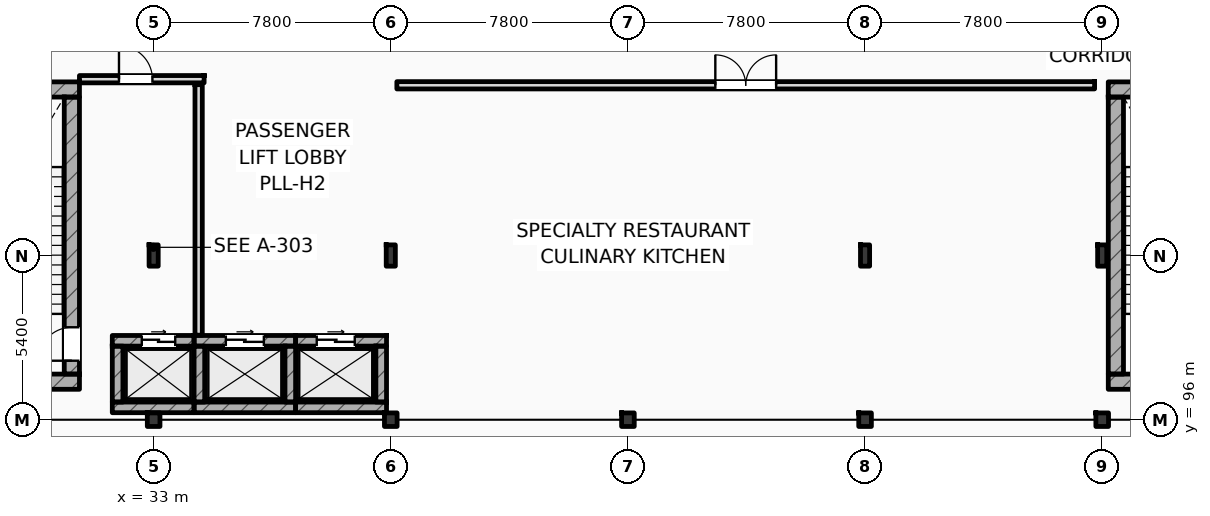
"""IFC4 building model, lengths in metres.
Left out: names, types, materials, properties, quantities, classifications, styles, units other than length and angle.
Written with IfcOpenShell. Run it as: python <this file> out.ifc"""

import sys

from ifc_helpers import new_model, si_unit, direction, frame, frame_2d, origin, origin_2d, place, context, subcontext, project, spatial, rectangle, i_section, extrude, element, fill, save


model = new_model("IFC4")
c1 = context("Model", 3, precision=1e-05, world=origin(), true_north=direction((0.0, 1.0)))
c2 = subcontext(c1, "Body", "Model", "MODEL_VIEW")
j1 = project(units=[si_unit("LENGTHUNIT", "METRE"), si_unit("PLANEANGLEUNIT", "RADIAN")], contexts=[c1])
p1 = place(None, origin())
s1 = spatial("IfcSite", under=j1, at=p1, CompositionType="ELEMENT")
p2 = place(p1, origin())
s2 = spatial("IfcBuilding", under=s1, at=p2, CompositionType="ELEMENT")
p3 = place(p2, frame((0.0, 0.0, 6.0)))
s3 = spatial("IfcBuildingStorey", under=s2, at=p3, CompositionType="ELEMENT", Elevation=6.0)
p4 = place(p3, frame((33.0, 96.0, 0.0), z_axis=(0.0, 0.0, 1.0), x_axis=(1.0, 0.0, 0.0)))
e1 = element("IfcColumn", 1, at=p4, inside=s3, PredefinedType="COLUMN", context=c2, shape_type="SweptSolid", body=[
    extrude(i_section(OverallWidth=0.416, OverallDepth=0.446, WebThickness=0.036, FlangeThickness=0.048, FilletRadius=0.015, at=origin_2d()), origin(), (0.0, 0.0, 1.0), 5.4),
])
p5 = place(p3, frame((33.0, 101.4, 0.0), z_axis=(0.0, 0.0, 1.0), x_axis=(1.0, 0.0, 0.0)))
e2 = element("IfcColumn", 2, at=p5, inside=s3, PredefinedType="COLUMN", context=c2, shape_type="SweptSolid", body=[
    extrude(i_section(OverallWidth=0.3, OverallDepth=0.7, WebThickness=0.017, FlangeThickness=0.032, FilletRadius=0.027, at=origin_2d()), origin(), (0.0, 0.0, 1.0), 5.4),
])
p6 = place(p3, frame((40.8, 96.0, 0.0), z_axis=(0.0, 0.0, 1.0), x_axis=(1.0, 0.0, 0.0)))
e3 = element("IfcColumn", 3, at=p6, inside=s3, PredefinedType="COLUMN", context=c2, shape_type="SweptSolid", body=[
    extrude(i_section(OverallWidth=0.416, OverallDepth=0.446, WebThickness=0.036, FlangeThickness=0.048, FilletRadius=0.015, at=origin_2d()), origin(), (0.0, 0.0, 1.0), 5.4),
])
p7 = place(p3, frame((40.8, 101.4, 0.0), z_axis=(0.0, 0.0, 1.0), x_axis=(1.0, 0.0, 0.0)))
e4 = element("IfcColumn", 4, at=p7, inside=s3, PredefinedType="COLUMN", context=c2, shape_type="SweptSolid", body=[
    extrude(i_section(OverallWidth=0.3, OverallDepth=0.7, WebThickness=0.017, FlangeThickness=0.032, FilletRadius=0.027, at=origin_2d()), origin(), (0.0, 0.0, 1.0), 5.4),
])
p8 = place(p3, frame((48.6, 96.0, 0.0), z_axis=(0.0, 0.0, 1.0), x_axis=(1.0, 0.0, 0.0)))
e5 = element("IfcColumn", 5, at=p8, inside=s3, PredefinedType="COLUMN", context=c2, shape_type="SweptSolid", body=[
    extrude(i_section(OverallWidth=0.416, OverallDepth=0.446, WebThickness=0.036, FlangeThickness=0.048, FilletRadius=0.015, at=origin_2d()), origin(), (0.0, 0.0, 1.0), 5.4),
])
p9 = place(p3, frame((48.6, 101.4, 0.0), z_axis=(0.0, 0.0, 1.0), x_axis=(1.0, 0.0, 0.0)))
e6 = element("IfcColumn", 6, at=p9, inside=s3, PredefinedType="COLUMN", context=c2, shape_type="SweptSolid", body=[
    extrude(i_section(OverallWidth=0.3, OverallDepth=0.7, WebThickness=0.017, FlangeThickness=0.032, FilletRadius=0.027, at=origin_2d()), origin(), (0.0, 0.0, 1.0), 5.4),
])
p10 = place(p3, frame((56.4, 96.0, 0.0), z_axis=(0.0, 0.0, 1.0), x_axis=(1.0, 0.0, 0.0)))
e7 = element("IfcColumn", 7, at=p10, inside=s3, PredefinedType="COLUMN", context=c2, shape_type="SweptSolid", body=[
    extrude(i_section(OverallWidth=0.416, OverallDepth=0.446, WebThickness=0.036, FlangeThickness=0.048, FilletRadius=0.015, at=origin_2d()), origin(), (0.0, 0.0, 1.0), 5.4),
])
p11 = place(p3, frame((56.4, 101.4, 0.0), z_axis=(0.0, 0.0, 1.0), x_axis=(1.0, 0.0, 0.0)))
e8 = element("IfcColumn", 8, at=p11, inside=s3, PredefinedType="COLUMN", context=c2, shape_type="SweptSolid", body=[
    extrude(i_section(OverallWidth=0.3, OverallDepth=0.7, WebThickness=0.017, FlangeThickness=0.032, FilletRadius=0.027, at=origin_2d()), origin(), (0.0, 0.0, 1.0), 5.4),
])
p12 = place(p3, frame((64.2, 96.0, 0.0), z_axis=(0.0, 0.0, 1.0), x_axis=(1.0, 0.0, 0.0)))
e9 = element("IfcColumn", 9, at=p12, inside=s3, PredefinedType="COLUMN", context=c2, shape_type="SweptSolid", body=[
    extrude(i_section(OverallWidth=0.416, OverallDepth=0.446, WebThickness=0.036, FlangeThickness=0.048, FilletRadius=0.015, at=origin_2d()), origin(), (0.0, 0.0, 1.0), 5.4),
])
p13 = place(p3, frame((64.2, 101.4, 0.0), z_axis=(0.0, 0.0, 1.0), x_axis=(1.0, 0.0, 0.0)))
e10 = element("IfcColumn", 10, at=p13, inside=s3, PredefinedType="COLUMN", context=c2, shape_type="SweptSolid", body=[
    extrude(i_section(OverallWidth=0.3, OverallDepth=0.7, WebThickness=0.017, FlangeThickness=0.032, FilletRadius=0.027, at=origin_2d()), origin(), (0.0, 0.0, 1.0), 5.4),
])
for number, where, z_axis, x_axis in (
    (11, (25.4, 106.862, 0.0), (0.0, 0.0, 1.0), (1.0, 0.0, 0.0)),
    (12, (25.4, 97.25, 0.0), (0.0, 0.0, 1.0), (1.0, 0.0, 0.0)),
):
    element("IfcWall", number, at=place(p3, frame(where, z_axis=z_axis, x_axis=x_axis)), inside=s3, PredefinedType="SHEAR", context=c2, shape_type="SweptSolid", body=[
        extrude(rectangle(XDim=5.16, YDim=0.5, at=frame_2d((2.58, 0.0))), origin(), (0.0, 0.0, 1.0), 5.4),
    ])
p14 = place(p3, frame((30.31, 97.5, 0.0), z_axis=(0.0, 0.0, 1.0), x_axis=(0.0, 1.0, 0.0)))
e13 = element("IfcWall", 13, at=p14, inside=s3, PredefinedType="SHEAR", context=c2, shape_type="SweptSolid", body=[
    extrude(rectangle(XDim=9.112, YDim=0.5, at=frame_2d((4.556, 0.0))), origin(), (0.0, 0.0, 1.0), 5.4),
])
p15 = place(p14, frame((0.44, 0.0, 0.0)))
e14 = element("IfcOpeningElement", 14, at=p15, cuts=e13, PredefinedType="OPENING", context=c2, shape_type="SweptSolid", body=[
    extrude(rectangle(XDim=1.1, YDim=2.2, at=frame_2d((0.55, 1.1))), frame((0.0, 0.26, 0.0), z_axis=(0.0, -1.0, 0.0), x_axis=(1.0, 0.0, 0.0)), (0.0, 0.0, 1.0), 0.52),
])
for number, where, z_axis, x_axis in (
    (15, (64.4, 106.862, 0.0), (0.0, 0.0, 1.0), (1.0, 0.0, 0.0)),
    (16, (64.4, 97.25, 0.0), (0.0, 0.0, 1.0), (1.0, 0.0, 0.0)),
):
    element("IfcWall", number, at=place(p3, frame(where, z_axis=z_axis, x_axis=x_axis)), inside=s3, PredefinedType="SHEAR", context=c2, shape_type="SweptSolid", body=[
        extrude(rectangle(XDim=5.16, YDim=0.5, at=frame_2d((2.58, 0.0))), origin(), (0.0, 0.0, 1.0), 5.4),
    ])
p16 = place(p3, frame((64.65, 97.5, 0.0), z_axis=(0.0, 0.0, 1.0), x_axis=(0.0, 1.0, 0.0)))
e17 = element("IfcWall", 17, at=p16, inside=s3, PredefinedType="SHEAR", context=c2, shape_type="SweptSolid", body=[
    extrude(rectangle(XDim=9.112, YDim=0.5, at=frame_2d((4.556, 0.0))), origin(), (0.0, 0.0, 1.0), 5.4),
])
p17 = place(p3, frame((31.64, 98.595, 0.0), z_axis=(0.0, 0.0, 1.0), x_axis=(1.0, 0.0, 0.0)))
e18 = element("IfcWall", 18, at=p17, inside=s3, PredefinedType="SHEAR", context=c2, shape_type="SweptSolid", body=[
    extrude(rectangle(XDim=2.69, YDim=0.35, at=frame_2d((1.345, 0.0))), origin(), (0.0, 0.0, 1.0), 5.05),
])
p18 = place(p17, frame((0.97, 0.0, 0.0)))
e19 = element("IfcOpeningElement", 19, at=p18, cuts=e18, PredefinedType="OPENING", context=c2, shape_type="SweptSolid", body=[
    extrude(rectangle(XDim=1.1, YDim=2.2, at=frame_2d((0.55, 1.1))), frame((0.0, 0.185, 0.0), z_axis=(0.0, -1.0, 0.0), x_axis=(1.0, 0.0, 0.0)), (0.0, 0.0, 1.0), 0.37),
])
p19 = place(p3, frame((31.64, 96.405, 0.0), z_axis=(0.0, 0.0, 1.0), x_axis=(1.0, 0.0, 0.0)))
e20 = element("IfcWall", 20, at=p19, inside=s3, PredefinedType="SHEAR", context=c2, shape_type="SweptSolid", body=[
    extrude(rectangle(XDim=2.69, YDim=0.35, at=frame_2d((1.345, 0.0))), origin(), (0.0, 0.0, 1.0), 5.05),
])
p20 = place(p3, frame((31.815, 96.58, 0.0), z_axis=(0.0, 0.0, 1.0), x_axis=(0.0, 1.0, 0.0)))
e21 = element("IfcWall", 21, at=p20, inside=s3, PredefinedType="SHEAR", context=c2, shape_type="SweptSolid", body=[
    extrude(rectangle(XDim=1.84, YDim=0.35, at=frame_2d((0.92, 0.0))), origin(), (0.0, 0.0, 1.0), 5.05),
])
p21 = place(p3, frame((34.33, 98.595, 0.0), z_axis=(0.0, 0.0, 1.0), x_axis=(1.0, 0.0, 0.0)))
e22 = element("IfcWall", 22, at=p21, inside=s3, PredefinedType="SHEAR", context=c2, shape_type="SweptSolid", body=[
    extrude(rectangle(XDim=3.34, YDim=0.35, at=frame_2d((1.67, 0.0))), origin(), (0.0, 0.0, 1.0), 5.05),
])
p22 = place(p21, frame((1.045, 0.0, 0.0)))
e23 = element("IfcOpeningElement", 23, at=p22, cuts=e22, PredefinedType="OPENING", context=c2, shape_type="SweptSolid", body=[
    extrude(rectangle(XDim=1.25, YDim=2.25, at=frame_2d((0.625, 1.125))), frame((0.0, 0.185, 0.0), z_axis=(0.0, -1.0, 0.0), x_axis=(1.0, 0.0, 0.0)), (0.0, 0.0, 1.0), 0.37),
])
p23 = place(p3, frame((34.33, 96.405, 0.0), z_axis=(0.0, 0.0, 1.0), x_axis=(1.0, 0.0, 0.0)))
e24 = element("IfcWall", 24, at=p23, inside=s3, PredefinedType="SHEAR", context=c2, shape_type="SweptSolid", body=[
    extrude(rectangle(XDim=3.34, YDim=0.35, at=frame_2d((1.67, 0.0))), origin(), (0.0, 0.0, 1.0), 5.05),
])
for number, where, z_axis, x_axis in (
    (25, (34.505, 96.58, 0.0), (0.0, 0.0, 1.0), (0.0, 1.0, 0.0)),
    (26, (37.495, 96.58, 0.0), (0.0, 0.0, 1.0), (0.0, 1.0, 0.0)),
):
    element("IfcWall", number, at=place(p3, frame(where, z_axis=z_axis, x_axis=x_axis)), inside=s3, PredefinedType="SHEAR", context=c2, shape_type="SweptSolid", body=[
        extrude(rectangle(XDim=1.84, YDim=0.35, at=frame_2d((0.92, 0.0))), origin(), (0.0, 0.0, 1.0), 5.05),
    ])
p24 = place(p3, frame((37.67, 98.595, 0.0), z_axis=(0.0, 0.0, 1.0), x_axis=(1.0, 0.0, 0.0)))
e27 = element("IfcWall", 27, at=p24, inside=s3, PredefinedType="SHEAR", context=c2, shape_type="SweptSolid", body=[
    extrude(rectangle(XDim=2.99, YDim=0.35, at=frame_2d((1.495, 0.0))), origin(), (0.0, 0.0, 1.0), 5.05),
])
p25 = place(p24, frame((0.695, 0.0, 0.0)))
e28 = element("IfcOpeningElement", 28, at=p25, cuts=e27, PredefinedType="OPENING", context=c2, shape_type="SweptSolid", body=[
    extrude(rectangle(XDim=1.25, YDim=2.25, at=frame_2d((0.625, 1.125))), frame((0.0, 0.185, 0.0), z_axis=(0.0, -1.0, 0.0), x_axis=(1.0, 0.0, 0.0)), (0.0, 0.0, 1.0), 0.37),
])
p26 = place(p3, frame((37.67, 96.405, 0.0), z_axis=(0.0, 0.0, 1.0), x_axis=(1.0, 0.0, 0.0)))
e29 = element("IfcWall", 29, at=p26, inside=s3, PredefinedType="SHEAR", context=c2, shape_type="SweptSolid", body=[
    extrude(rectangle(XDim=2.99, YDim=0.35, at=frame_2d((1.495, 0.0))), origin(), (0.0, 0.0, 1.0), 5.05),
])
p27 = place(p3, frame((40.485, 96.58, 0.0), z_axis=(0.0, 0.0, 1.0), x_axis=(0.0, 1.0, 0.0)))
e30 = element("IfcWall", 30, at=p27, inside=s3, PredefinedType="SHEAR", context=c2, shape_type="SweptSolid", body=[
    extrude(rectangle(XDim=1.84, YDim=0.35, at=frame_2d((0.92, 0.0))), origin(), (0.0, 0.0, 1.0), 4.59),
])
p28 = place(p3, frame((34.48, 98.78, 0.0), z_axis=(0.0, 0.0, 1.0), x_axis=(0.0, 1.0, 0.0)))
e31 = element("IfcWall", 31, at=p28, inside=s3, PredefinedType="STANDARD", context=c2, shape_type="SweptSolid", body=[
    extrude(rectangle(XDim=8.24, YDim=0.24, at=frame_2d((4.12, 0.0))), origin(), (0.0, 0.0, 1.0), 5.05),
])
p29 = place(p3, frame((30.56, 107.2, 0.0), z_axis=(0.0, 0.0, 1.0), x_axis=(1.0, 0.0, 0.0)))
e32 = element("IfcWall", 32, at=p29, inside=s3, PredefinedType="STANDARD", context=c2, shape_type="SweptSolid", body=[
    extrude(rectangle(XDim=4.1, YDim=0.24, at=frame_2d((2.05, 0.0))), origin(), (0.0, 0.0, 1.0), 5.05),
])
p30 = place(p29, frame((1.3, 0.0, 0.0)))
e33 = element("IfcOpeningElement", 33, at=p30, cuts=e32, PredefinedType="OPENING", context=c2, shape_type="SweptSolid", body=[
    extrude(rectangle(XDim=1.1, YDim=2.2, at=frame_2d((0.55, 1.1))), frame((0.0, 0.13, 0.0), z_axis=(0.0, -1.0, 0.0), x_axis=(1.0, 0.0, 0.0)), (0.0, 0.0, 1.0), 0.26),
])
p31 = place(p3, frame((41.0, 107.0, 0.0), z_axis=(0.0, 0.0, 1.0), x_axis=(1.0, 0.0, 0.0)))
e34 = element("IfcWall", 34, at=p31, inside=s3, PredefinedType="STANDARD", context=c2, shape_type="SweptSolid", body=[
    extrude(rectangle(XDim=22.95, YDim=0.24, at=frame_2d((11.475, 0.0))), origin(), (0.0, 0.0, 1.0), 5.05),
])
p32 = place(p31, frame((10.475, 0.0, 0.0)))
e35 = element("IfcOpeningElement", 35, at=p32, cuts=e34, PredefinedType="OPENING", context=c2, shape_type="SweptSolid", body=[
    extrude(rectangle(XDim=2.0, YDim=2.35, at=frame_2d((1.0, 1.175))), frame((0.0, 0.13, 0.0), z_axis=(0.0, -1.0, 0.0), x_axis=(1.0, 0.0, 0.0)), (0.0, 0.0, 1.0), 0.26),
])
p33 = place(p15, origin())
e36 = element("IfcDoor", 36, at=p33, inside=s3, OperationType="SINGLE_SWING_LEFT", PredefinedType="DOOR", context=c2, shape_type="SweptSolid", body=[
    extrude(rectangle(XDim=1.1, YDim=2.2, at=frame_2d((0.55, 1.1))), frame((0.0, 0.025, 0.0), z_axis=(0.0, -1.0, 0.0), x_axis=(1.0, 0.0, 0.0)), (0.0, 0.0, 1.0), 0.05),
])
fill(e14, e36)
p34 = place(p18, origin())
e37 = element("IfcDoor", 37, at=p34, inside=s3, OperationType="SLIDING_TO_LEFT", PredefinedType="DOOR", context=c2, shape_type="SweptSolid", body=[
    extrude(rectangle(XDim=1.1, YDim=2.2, at=frame_2d((0.55, 1.1))), frame((0.0, 0.025, 0.0), z_axis=(0.0, -1.0, 0.0), x_axis=(1.0, 0.0, 0.0)), (0.0, 0.0, 1.0), 0.05),
])
fill(e19, e37)
p35 = place(p22, origin())
e38 = element("IfcDoor", 38, at=p35, inside=s3, OperationType="SLIDING_TO_LEFT", PredefinedType="DOOR", context=c2, shape_type="SweptSolid", body=[
    extrude(rectangle(XDim=1.25, YDim=2.25, at=frame_2d((0.625, 1.125))), frame((0.0, 0.025, 0.0), z_axis=(0.0, -1.0, 0.0), x_axis=(1.0, 0.0, 0.0)), (0.0, 0.0, 1.0), 0.05),
])
fill(e23, e38)
p36 = place(p25, origin())
e39 = element("IfcDoor", 39, at=p36, inside=s3, OperationType="SLIDING_TO_LEFT", PredefinedType="DOOR", context=c2, shape_type="SweptSolid", body=[
    extrude(rectangle(XDim=1.25, YDim=2.25, at=frame_2d((0.625, 1.125))), frame((0.0, 0.025, 0.0), z_axis=(0.0, -1.0, 0.0), x_axis=(1.0, 0.0, 0.0)), (0.0, 0.0, 1.0), 0.05),
])
fill(e28, e39)
p37 = place(p30, origin())
e40 = element("IfcDoor", 40, at=p37, inside=s3, OperationType="SINGLE_SWING_LEFT", PredefinedType="DOOR", context=c2, shape_type="SweptSolid", body=[
    extrude(rectangle(XDim=1.1, YDim=2.2, at=frame_2d((0.55, 1.1))), frame((0.0, 0.025, 0.0), z_axis=(0.0, -1.0, 0.0), x_axis=(1.0, 0.0, 0.0)), (0.0, 0.0, 1.0), 0.05),
])
fill(e33, e40)
p38 = place(p32, origin())
e41 = element("IfcDoor", 41, at=p38, inside=s3, OperationType="DOUBLE_SWING_LEFT", PredefinedType="DOOR", context=c2, shape_type="SweptSolid", body=[
    extrude(rectangle(XDim=2.0, YDim=2.35, at=frame_2d((1.0, 1.175))), frame((0.0, 0.025, 0.0), z_axis=(0.0, -1.0, 0.0), x_axis=(1.0, 0.0, 0.0)), (0.0, 0.0, 1.0), 0.05),
])
fill(e35, e41)
save(model, sys.argv[1])
